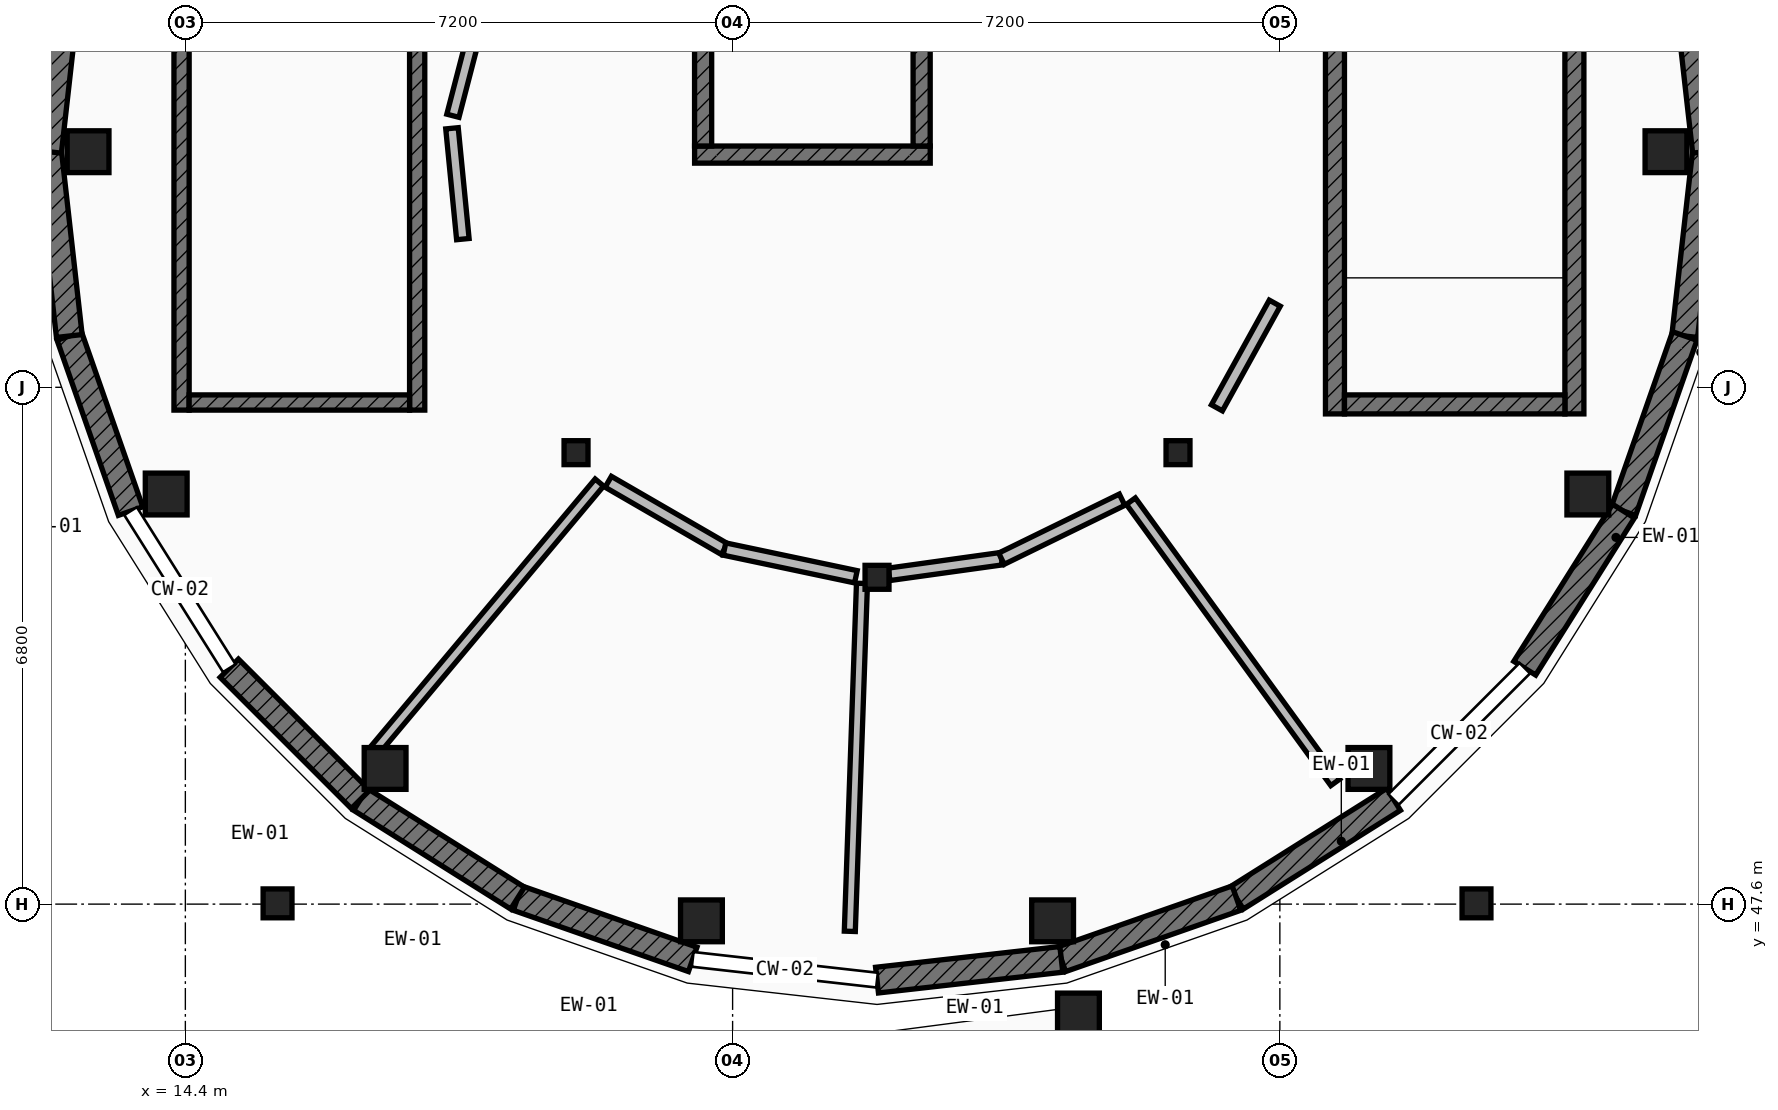
"""IFC4 building model, lengths in metres.
Left out: names, types, materials, properties, quantities, classifications, styles, units other than length and angle.
Written with IfcOpenShell. Run it as: python <this file> out.ifc"""

import sys

from ifc_helpers import new_model, si_unit, direction, frame, frame_2d, origin, origin_2d, place, context, subcontext, project, spatial, rectangle, circle, extrude, element, fill, save


model = new_model("IFC4")
c1 = context("Model", 3, precision=1e-05, world=origin(), true_north=direction((0.0, 1.0)))
c2 = subcontext(c1, "Body", "Model", "MODEL_VIEW")
j1 = project(units=[si_unit("LENGTHUNIT", "METRE"), si_unit("PLANEANGLEUNIT", "RADIAN")], contexts=[c1])
p1 = place(None, origin())
s1 = spatial("IfcSite", under=j1, at=p1, CompositionType="ELEMENT")
p2 = place(p1, origin())
s2 = spatial("IfcBuilding", under=s1, at=p2, CompositionType="ELEMENT")
p3 = place(p2, origin())
s3 = spatial("IfcBuildingStorey", under=s2, at=p3, CompositionType="ELEMENT", Elevation=0.0)
for number, where, z_axis, x_axis in (
    (1, (33.88, 57.5, 0.0), (0.0, 0.0, 1.0), (1.0, 0.0, 0.0)),
    (2, (13.12, 57.5, 0.0), (0.0, 0.0, 1.0), (1.0, 0.0, 0.0)),
    (3, (14.148, 52.996, 0.0), (0.0, 0.0, 1.0), (1.0, 0.0, 0.0)),
    (4, (17.028, 49.385, 0.0), (0.0, 0.0, 1.0), (1.0, 0.0, 0.0)),
    (5, (21.19, 47.38, 0.0), (0.0, 0.0, 1.0), (1.0, 0.0, 0.0)),
    (6, (25.81, 47.38, 0.0), (0.0, 0.0, 1.0), (1.0, 0.0, 0.0)),
    (7, (29.972, 49.385, 0.0), (0.0, 0.0, 1.0), (1.0, 0.0, 0.0)),
    (8, (32.852, 52.996, 0.0), (0.0, 0.0, 1.0), (1.0, 0.0, 0.0)),
):
    element("IfcColumn", number, at=place(p3, frame(where, z_axis=z_axis, x_axis=x_axis)), inside=s3, PredefinedType="PILASTER", context=c2, shape_type="SweptSolid", body=[
        extrude(circle(Radius=0.275, at=origin_2d()), origin(), (0.0, 0.0, 1.0), 4.55),
    ])
for number, where, z_axis, x_axis in (
    (9, (19.54, 53.54, 0.0), (0.0, 0.0, 1.0), (1.0, 0.0, 0.0)),
    (10, (23.5, 51.9, 0.0), (0.0, 0.0, 1.0), (1.0, 0.0, 0.0)),
    (11, (27.46, 53.54, 0.0), (0.0, 0.0, 1.0), (1.0, 0.0, 0.0)),
):
    element("IfcColumn", number, at=place(p3, frame(where, z_axis=z_axis, x_axis=x_axis)), inside=s3, PredefinedType="COLUMN", context=c2, shape_type="SweptSolid", body=[
        extrude(rectangle(XDim=0.315, YDim=0.315, at=origin_2d()), origin(), (0.0, 0.0, 1.0), 4.55),
    ])
p4 = place(p3, frame((26.15, 46.154, 0.0), z_axis=(0.0, 0.0, 1.0), x_axis=(1.0, 0.0, 0.0)))
e12 = element("IfcColumn", 12, at=p4, inside=s3, PredefinedType="PILASTER", context=c2, shape_type="SweptSolid", body=[
    extrude(circle(Radius=0.275, at=origin_2d()), origin(), (0.0, 0.0, 1.0), 4.55),
])
for number, where, z_axis, x_axis in (
    (13, (15.613, 47.61, 1.15), (0.0, 0.0, 1.0), (1.0, 0.0, 0.0)),
    (14, (31.387, 47.61, 1.15), (0.0, 0.0, 1.0), (1.0, 0.0, 0.0)),
):
    element("IfcColumn", number, at=place(p3, frame(where, z_axis=z_axis, x_axis=x_axis)), inside=s3, PredefinedType="PILASTER", context=c2, shape_type="SweptSolid", body=[
        extrude(circle(Radius=0.19, at=origin_2d()), origin(), (0.0, 0.0, 1.0), 3.4),
    ])
p5 = place(p3, frame((34.4, 57.5, 0.0), z_axis=(0.0, 0.0, 1.0), x_axis=(-0.111847873866, -0.993725340882, 0.0)))
e15 = element("IfcWall", 15, at=p5, inside=s3, PredefinedType="SOLIDWALL", context=c2, shape_type="SweptSolid", body=[
    extrude(rectangle(XDim=2.44, YDim=0.34, at=frame_2d((1.22, 0.0))), origin(), (0.0, 0.0, 1.0), 3.659),
])
p6 = place(p3, frame((34.127, 55.075, 0.0), z_axis=(0.0, 0.0, 1.0), x_axis=(-0.330176659411, -0.943919156274, 0.0)))
e16 = element("IfcWall", 16, at=p6, inside=s3, PredefinedType="SOLIDWALL", context=c2, shape_type="SweptSolid", body=[
    extrude(rectangle(XDim=2.441, YDim=0.34, at=frame_2d((1.22, 0.0))), origin(), (0.0, 0.0, 1.0), 3.659),
])
p7 = place(p3, frame((33.321, 52.771, 0.0), z_axis=(0.0, 0.0, 1.0), x_axis=(-0.532136726684, -0.846658434148, 0.0)))
e17 = element("IfcWall", 17, at=p7, inside=s3, PredefinedType="SOLIDWALL", context=c2, shape_type="SweptSolid", body=[
    extrude(rectangle(XDim=2.441, YDim=0.34, at=frame_2d((1.221, 0.0))), origin(), (0.0, 0.0, 1.0), 3.659),
])
p8 = place(p7, frame((0.521, 0.0, 0.0)))
e18 = element("IfcOpeningElement", 18, at=p8, cuts=e17, PredefinedType="OPENING", context=c2, shape_type="SweptSolid", body=[
    extrude(rectangle(XDim=1.4, YDim=2.3, at=frame_2d((0.7, 1.15))), frame((0.0, 0.18, 0.0), z_axis=(0.0, -1.0, 0.0), x_axis=(1.0, 0.0, 0.0)), (0.0, 0.0, 1.0), 0.36),
])
p9 = place(p3, frame((30.296, 48.978, 0.0), z_axis=(0.0, 0.0, 1.0), x_axis=(-0.846658434148, -0.532136726684, 0.0)))
e19 = element("IfcWall", 19, at=p9, inside=s3, PredefinedType="SOLIDWALL", context=c2, shape_type="SweptSolid", body=[
    extrude(rectangle(XDim=2.441, YDim=0.34, at=frame_2d((1.221, 0.0))), origin(), (0.0, 0.0, 1.0), 3.659),
])
p10 = place(p3, frame((28.229, 47.679, 0.0), z_axis=(0.0, 0.0, 1.0), x_axis=(-0.943919156274, -0.330176659411, 0.0)))
e20 = element("IfcWall", 20, at=p10, inside=s3, PredefinedType="SOLIDWALL", context=c2, shape_type="SweptSolid", body=[
    extrude(rectangle(XDim=2.441, YDim=0.34, at=frame_2d((1.22, 0.0))), origin(), (0.0, 0.0, 1.0), 3.659),
])
p11 = place(p3, frame((25.925, 46.873, 0.0), z_axis=(0.0, 0.0, 1.0), x_axis=(-0.993725340882, -0.111847873866, 0.0)))
e21 = element("IfcWall", 21, at=p11, inside=s3, PredefinedType="SOLIDWALL", context=c2, shape_type="SweptSolid", body=[
    extrude(rectangle(XDim=2.44, YDim=0.34, at=frame_2d((1.22, 0.0))), origin(), (0.0, 0.0, 1.0), 3.659),
])
p12 = place(p3, frame((21.075, 46.873, 0.0), z_axis=(0.0, 0.0, 1.0), x_axis=(-0.943919156274, 0.330176659411, 0.0)))
e22 = element("IfcWall", 22, at=p12, inside=s3, PredefinedType="SOLIDWALL", context=c2, shape_type="SweptSolid", body=[
    extrude(rectangle(XDim=2.441, YDim=0.34, at=frame_2d((1.22, 0.0))), origin(), (0.0, 0.0, 1.0), 3.659),
])
p13 = place(p3, frame((18.771, 47.679, 0.0), z_axis=(0.0, 0.0, 1.0), x_axis=(-0.846658434148, 0.532136726684, 0.0)))
e23 = element("IfcWall", 23, at=p13, inside=s3, PredefinedType="SOLIDWALL", context=c2, shape_type="SweptSolid", body=[
    extrude(rectangle(XDim=2.441, YDim=0.34, at=frame_2d((1.221, 0.0))), origin(), (0.0, 0.0, 1.0), 3.659),
])
p14 = place(p13, frame((0.571, 0.0, 0.0)))
e24 = element("IfcOpeningElement", 24, at=p14, cuts=e23, PredefinedType="OPENING", context=c2, shape_type="SweptSolid", body=[
    extrude(rectangle(XDim=1.3, YDim=2.25, at=frame_2d((0.65, 1.125))), frame((0.0, 0.18, 0.0), z_axis=(0.0, -1.0, 0.0), x_axis=(1.0, 0.0, 0.0)), (0.0, 0.0, 1.0), 0.36),
])
for number, where, z_axis, x_axis in (
    (25, (16.704, 48.978, 0.0), (0.0, 0.0, 1.0), (-0.707, 0.707, 0.0)),
    (26, (13.679, 52.771, 0.0), (0.0, 0.0, 1.0), (-0.33, 0.944, 0.0)),
):
    element("IfcWall", number, at=place(p3, frame(where, z_axis=z_axis, x_axis=x_axis)), inside=s3, PredefinedType="SOLIDWALL", context=c2, shape_type="SweptSolid", body=[
        extrude(rectangle(XDim=2.441, YDim=0.34, at=frame_2d((1.22, 0.0))), origin(), (0.0, 0.0, 1.0), 3.659),
    ])
for number, where, z_axis, x_axis in (
    (27, (12.873, 55.075, 0.0), (0.0, 0.0, 1.0), (-0.112, 0.994, 0.0)),
    (28, (12.6, 57.5, 0.0), (0.0, 0.0, 1.0), (0.112, 0.994, 0.0)),
    (29, (34.127, 59.925, 0.0), (0.0, 0.0, 1.0), (0.112, -0.994, 0.0)),
):
    element("IfcWall", number, at=place(p3, frame(where, z_axis=z_axis, x_axis=x_axis)), inside=s3, PredefinedType="SOLIDWALL", context=c2, shape_type="SweptSolid", body=[
        extrude(rectangle(XDim=2.44, YDim=0.34, at=frame_2d((1.22, 0.0))), origin(), (0.0, 0.0, 1.0), 3.659),
    ])
p15 = place(p2, frame((0.0, 0.0, -4.55)))
s4 = spatial("IfcBuildingStorey", under=s2, at=p15, CompositionType="ELEMENT", Elevation=-4.55)
p16 = place(p15, frame((33.906, 54.0, 0.0), z_axis=(0.0, 0.0, 1.0), x_axis=(1.0, 0.0, 0.0)))
e30 = element("IfcWall", 30, at=p16, inside=s4, PredefinedType="USERDEFINED", context=c2, shape_type="SweptSolid", body=[
    extrude(rectangle(XDim=5.27, YDim=0.4, at=frame_2d((2.635, 0.0))), origin(), (0.0, 0.0, 1.0), 6.68),
])
p17 = place(p3, frame((29.525, 60.95, 0.0), z_axis=(0.0, 0.0, 1.0), x_axis=(0.0, -1.0, 0.0)))
e31 = element("IfcWall", 31, at=p17, inside=s3, PredefinedType="SHEAR", context=c2, shape_type="SweptSolid", body=[
    extrude(rectangle(XDim=6.9, YDim=0.25, at=frame_2d((3.45, 0.0))), origin(), (0.0, 0.0, 1.0), 4.305),
])
p18 = place(p17, frame((0.43, 0.0, 0.0)))
e32 = element("IfcOpeningElement", 32, at=p18, cuts=e31, PredefinedType="OPENING", context=c2, shape_type="SweptSolid", body=[
    extrude(rectangle(XDim=1.1, YDim=2.15, at=frame_2d((0.55, 1.075))), frame((0.0, 0.135, 0.0), z_axis=(0.0, -1.0, 0.0), x_axis=(1.0, 0.0, 0.0)), (0.0, 0.0, 1.0), 0.27),
])
p19 = place(p3, frame((32.675, 60.95, 0.0), z_axis=(0.0, 0.0, 1.0), x_axis=(0.0, -1.0, 0.0)))
e33 = element("IfcWall", 33, at=p19, inside=s3, PredefinedType="SHEAR", context=c2, shape_type="SweptSolid", body=[
    extrude(rectangle(XDim=6.9, YDim=0.25, at=frame_2d((3.45, 0.0))), origin(), (0.0, 0.0, 1.0), 4.305),
])
p20 = place(p3, frame((29.65, 54.175, 0.0), z_axis=(0.0, 0.0, 1.0), x_axis=(1.0, 0.0, 0.0)))
e34 = element("IfcWall", 34, at=p20, inside=s3, PredefinedType="SHEAR", context=c2, shape_type="SweptSolid", body=[
    extrude(rectangle(XDim=2.9, YDim=0.25, at=frame_2d((1.45, 0.0))), origin(), (0.0, 0.0, 1.0), 4.305),
])
p21 = place(p3, frame((17.45, 54.1, 0.0), z_axis=(0.0, 0.0, 1.0), x_axis=(0.0, 1.0, 0.0)))
e35 = element("IfcWall", 35, at=p21, inside=s3, PredefinedType="SHEAR", context=c2, shape_type="SweptSolid", body=[
    extrude(rectangle(XDim=6.8, YDim=0.2, at=frame_2d((3.4, 0.0))), origin(), (0.0, 0.0, 1.0), 4.305),
])
p22 = place(p21, frame((0.38, 0.0, 0.0)))
e36 = element("IfcOpeningElement", 36, at=p22, cuts=e35, PredefinedType="OPENING", context=c2, shape_type="SweptSolid", body=[
    extrude(rectangle(XDim=1.05, YDim=2.15, at=frame_2d((0.525, 1.075))), frame((0.0, 0.11, 0.0), z_axis=(0.0, -1.0, 0.0), x_axis=(1.0, 0.0, 0.0)), (0.0, 0.0, 1.0), 0.22),
])
p23 = place(p3, frame((14.35, 54.1, 0.0), z_axis=(0.0, 0.0, 1.0), x_axis=(0.0, 1.0, 0.0)))
e37 = element("IfcWall", 37, at=p23, inside=s3, PredefinedType="SHEAR", context=c2, shape_type="SweptSolid", body=[
    extrude(rectangle(XDim=6.8, YDim=0.2, at=frame_2d((3.4, 0.0))), origin(), (0.0, 0.0, 1.0), 4.305),
])
p24 = place(p3, frame((17.35, 54.2, 0.0), z_axis=(0.0, 0.0, 1.0), x_axis=(-1.0, 0.0, 0.0)))
e38 = element("IfcWall", 38, at=p24, inside=s3, PredefinedType="SHEAR", context=c2, shape_type="SweptSolid", body=[
    extrude(rectangle(XDim=2.9, YDim=0.2, at=frame_2d((1.45, 0.0))), origin(), (0.0, 0.0, 1.0), 4.305),
])
p25 = place(p3, frame((21.1, 57.462, 0.0), z_axis=(0.0, 0.0, 1.0), x_axis=(1.0, 0.0, 0.0)))
e39 = element("IfcWall", 39, at=p25, inside=s3, PredefinedType="SHEAR", context=c2, shape_type="SweptSolid", body=[
    extrude(rectangle(XDim=3.1, YDim=0.225, at=frame_2d((1.55, 0.0))), origin(), (0.0, 0.0, 1.0), 4.305),
])
p26 = place(p25, frame((0.95, 0.0, 0.0)))
e40 = element("IfcOpeningElement", 40, at=p26, cuts=e39, PredefinedType="OPENING", context=c2, shape_type="SweptSolid", body=[
    extrude(rectangle(XDim=1.2, YDim=2.2, at=frame_2d((0.6, 1.1))), frame((0.0, 0.123, 0.0), z_axis=(0.0, -1.0, 0.0), x_axis=(1.0, 0.0, 0.0)), (0.0, 0.0, 1.0), 0.245),
])
for number, where, z_axis, x_axis in (
    (41, (21.212, 57.575, 0.0), (0.0, 0.0, 1.0), (0.0, 1.0, 0.0)),
    (42, (24.087, 57.575, 0.0), (0.0, 0.0, 1.0), (0.0, 1.0, 0.0)),
):
    element("IfcWall", number, at=place(p3, frame(where, z_axis=z_axis, x_axis=x_axis)), inside=s3, PredefinedType="SHEAR", context=c2, shape_type="SweptSolid", body=[
        extrude(rectangle(XDim=2.15, YDim=0.225, at=frame_2d((1.075, 0.0))), origin(), (0.0, 0.0, 1.0), 4.305),
    ])
p27 = place(p3, frame((19.847, 53.147, 0.0), z_axis=(0.0, 0.0, 1.0), x_axis=(-0.64262938355, -0.766177182771, 0.0)))
e43 = element("IfcWall", 43, at=p27, inside=s3, PredefinedType="PARTITIONING", context=c2, shape_type="SweptSolid", body=[
    extrude(rectangle(XDim=4.59, YDim=0.145, at=frame_2d((2.295, 0.0))), origin(), (0.0, 0.0, 1.0), 3.634),
])
p28 = place(p3, frame((23.302, 51.82, 0.0), z_axis=(0.0, 0.0, 1.0), x_axis=(-0.034908318573, -0.999390518914, 0.0)))
e44 = element("IfcWall", 44, at=p28, inside=s3, PredefinedType="PARTITIONING", context=c2, shape_type="SweptSolid", body=[
    extrude(rectangle(XDim=4.581, YDim=0.145, at=frame_2d((2.291, 0.0))), origin(), (0.0, 0.0, 1.0), 3.634),
])
p29 = place(p3, frame((26.84, 52.902, 0.0), z_axis=(0.0, 0.0, 1.0), x_axis=(0.587873334136, -0.808952991843, 0.0)))
e45 = element("IfcWall", 45, at=p29, inside=s3, PredefinedType="PARTITIONING", context=c2, shape_type="SweptSolid", body=[
    extrude(rectangle(XDim=4.574, YDim=0.145, at=frame_2d((2.287, 0.0))), origin(), (0.0, 0.0, 1.0), 3.634),
])
p30 = place(p3, frame((18.395, 59.803, 0.0), z_axis=(0.0, 0.0, 1.0), x_axis=(-0.251275827958, -0.967915522287, 0.0)))
e46 = element("IfcWall", 46, at=p30, inside=s3, PredefinedType="PARTITIONING", context=c2, shape_type="SweptSolid", body=[
    extrude(rectangle(XDim=1.891, YDim=0.165, at=frame_2d((0.945, 0.0))), origin(), (0.0, 0.0, 1.0), 3.634),
])
p31 = place(p3, frame((17.908, 57.808, 0.0), z_axis=(0.0, 0.0, 1.0), x_axis=(0.097655572539, -0.995220271675, 0.0)))
e47 = element("IfcWall", 47, at=p31, inside=s3, PredefinedType="PARTITIONING", context=c2, shape_type="SweptSolid", body=[
    extrude(rectangle(XDim=1.465, YDim=0.165, at=frame_2d((0.732, 0.0))), origin(), (0.0, 0.0, 1.0), 3.634),
])
p32 = place(p3, frame((19.964, 53.157, 0.0), z_axis=(0.0, 0.0, 1.0), x_axis=(0.865448363254, -0.500998134269, 0.0)))
e48 = element("IfcWall", 48, at=p32, inside=s3, PredefinedType="PARTITIONING", context=c2, shape_type="SweptSolid", body=[
    extrude(rectangle(XDim=1.767, YDim=0.165, at=frame_2d((0.883, 0.0))), origin(), (0.0, 0.0, 1.0), 3.634),
])
p33 = place(p32, frame((0.403, 0.0, 0.0)))
e49 = element("IfcOpeningElement", 49, at=p33, cuts=e48, PredefinedType="OPENING", context=c2, shape_type="SweptSolid", body=[
    extrude(rectangle(XDim=0.96, YDim=2.12, at=frame_2d((0.48, 1.06))), frame((0.0, 0.093, 0.0), z_axis=(0.0, -1.0, 0.0), x_axis=(1.0, 0.0, 0.0)), (0.0, 0.0, 1.0), 0.185),
])
p34 = place(p3, frame((21.493, 52.272, 0.0), z_axis=(0.0, 0.0, 1.0), x_axis=(0.978436766116, -0.206546592113, 0.0)))
e50 = element("IfcWall", 50, at=p34, inside=s3, PredefinedType="PARTITIONING", context=c2, shape_type="SweptSolid", body=[
    extrude(rectangle(XDim=1.767, YDim=0.165, at=frame_2d((0.884, 0.0))), origin(), (0.0, 0.0, 1.0), 3.634),
])
p35 = place(p3, frame((23.658, 51.939, 0.0), z_axis=(0.0, 0.0, 1.0), x_axis=(0.99043401567, 0.137987175508, 0.0)))
e51 = element("IfcWall", 51, at=p35, inside=s3, PredefinedType="PARTITIONING", context=c2, shape_type="SweptSolid", body=[
    extrude(rectangle(XDim=1.493, YDim=0.165, at=frame_2d((0.747, 0.0))), origin(), (0.0, 0.0, 1.0), 3.634),
])
p36 = place(p35, frame((0.247, 0.0, 0.0)))
e52 = element("IfcOpeningElement", 52, at=p36, cuts=e51, PredefinedType="OPENING", context=c2, shape_type="SweptSolid", body=[
    extrude(rectangle(XDim=1.0, YDim=2.14, at=frame_2d((0.5, 1.07))), frame((0.0, 0.093, 0.0), z_axis=(0.0, -1.0, 0.0), x_axis=(1.0, 0.0, 0.0)), (0.0, 0.0, 1.0), 0.185),
])
p37 = place(p3, frame((25.137, 52.145, 0.0), z_axis=(0.0, 0.0, 1.0), x_axis=(0.898398901361, 0.439180388944, 0.0)))
e53 = element("IfcWall", 53, at=p37, inside=s3, PredefinedType="PARTITIONING", context=c2, shape_type="SweptSolid", body=[
    extrude(rectangle(XDim=1.767, YDim=0.165, at=frame_2d((0.883, 0.0))), origin(), (0.0, 0.0, 1.0), 3.634),
])
p38 = place(p3, frame((27.972, 54.13, 0.0), z_axis=(0.0, 0.0, 1.0), x_axis=(0.483639192056, 0.875267463069, 0.0)))
e54 = element("IfcWall", 54, at=p38, inside=s3, PredefinedType="PARTITIONING", context=c2, shape_type="SweptSolid", body=[
    extrude(rectangle(XDim=1.573, YDim=0.165, at=frame_2d((0.787, 0.0))), origin(), (0.0, 0.0, 1.0), 3.634),
])
p39 = place(p38, frame((0.267, 0.0, 0.0)))
e55 = element("IfcOpeningElement", 55, at=p39, cuts=e54, PredefinedType="OPENING", context=c2, shape_type="SweptSolid", body=[
    extrude(rectangle(XDim=1.04, YDim=2.14, at=frame_2d((0.52, 1.07))), frame((0.0, 0.093, 0.0), z_axis=(0.0, -1.0, 0.0), x_axis=(1.0, 0.0, 0.0)), (0.0, 0.0, 1.0), 0.185),
])
p40 = place(p8, origin())
e56 = element("IfcDoor", 56, at=p40, inside=s3, OperationType="SINGLE_SWING_LEFT", PredefinedType="DOOR", context=c2, shape_type="SweptSolid", body=[
    extrude(rectangle(XDim=1.4, YDim=2.3, at=frame_2d((0.7, 1.15))), frame((0.0, 0.025, 0.0), z_axis=(0.0, -1.0, 0.0), x_axis=(1.0, 0.0, 0.0)), (0.0, 0.0, 1.0), 0.05),
])
fill(e18, e56)
p41 = place(p14, origin())
e57 = element("IfcDoor", 57, at=p41, inside=s3, OperationType="SINGLE_SWING_RIGHT", PredefinedType="DOOR", context=c2, shape_type="SweptSolid", body=[
    extrude(rectangle(XDim=1.3, YDim=2.25, at=frame_2d((0.65, 1.125))), frame((0.0, 0.025, 0.0), z_axis=(0.0, -1.0, 0.0), x_axis=(1.0, 0.0, 0.0)), (0.0, 0.0, 1.0), 0.05),
])
fill(e24, e57)
p42 = place(p22, origin())
e58 = element("IfcDoor", 58, at=p42, inside=s3, OperationType="SINGLE_SWING_LEFT", PredefinedType="DOOR", context=c2, shape_type="SweptSolid", body=[
    extrude(rectangle(XDim=1.05, YDim=2.15, at=frame_2d((0.525, 1.075))), frame((0.0, 0.025, 0.0), z_axis=(0.0, -1.0, 0.0), x_axis=(1.0, 0.0, 0.0)), (0.0, 0.0, 1.0), 0.05),
])
fill(e36, e58)
p43 = place(p26, origin())
e59 = element("IfcDoor", 59, at=p43, inside=s3, OperationType="DOUBLE_DOOR_SLIDING", PredefinedType="DOOR", context=c2, shape_type="SweptSolid", body=[
    extrude(rectangle(XDim=1.2, YDim=2.2, at=frame_2d((0.6, 1.1))), frame((0.0, 0.025, 0.0), z_axis=(0.0, -1.0, 0.0), x_axis=(1.0, 0.0, 0.0)), (0.0, 0.0, 1.0), 0.05),
])
fill(e40, e59)
p44 = place(p33, origin())
e60 = element("IfcDoor", 60, at=p44, inside=s3, OperationType="SINGLE_SWING_LEFT", PredefinedType="DOOR", context=c2, shape_type="SweptSolid", body=[
    extrude(rectangle(XDim=0.96, YDim=2.12, at=frame_2d((0.48, 1.06))), frame((0.0, 0.025, 0.0), z_axis=(0.0, -1.0, 0.0), x_axis=(1.0, 0.0, 0.0)), (0.0, 0.0, 1.0), 0.05),
])
fill(e49, e60)
p45 = place(p36, origin())
e61 = element("IfcDoor", 61, at=p45, inside=s3, OperationType="SINGLE_SWING_RIGHT", PredefinedType="DOOR", context=c2, shape_type="SweptSolid", body=[
    extrude(rectangle(XDim=1.0, YDim=2.14, at=frame_2d((0.5, 1.07))), frame((0.0, 0.025, 0.0), z_axis=(0.0, -1.0, 0.0), x_axis=(1.0, 0.0, 0.0)), (0.0, 0.0, 1.0), 0.05),
])
fill(e52, e61)
p46 = place(p39, origin())
e62 = element("IfcDoor", 62, at=p46, inside=s3, OperationType="SINGLE_SWING_LEFT", PredefinedType="DOOR", context=c2, shape_type="SweptSolid", body=[
    extrude(rectangle(XDim=1.04, YDim=2.14, at=frame_2d((0.52, 1.07))), frame((0.0, 0.025, 0.0), z_axis=(0.0, -1.0, 0.0), x_axis=(1.0, 0.0, 0.0)), (0.0, 0.0, 1.0), 0.05),
])
fill(e55, e62)
save(model, sys.argv[1])
